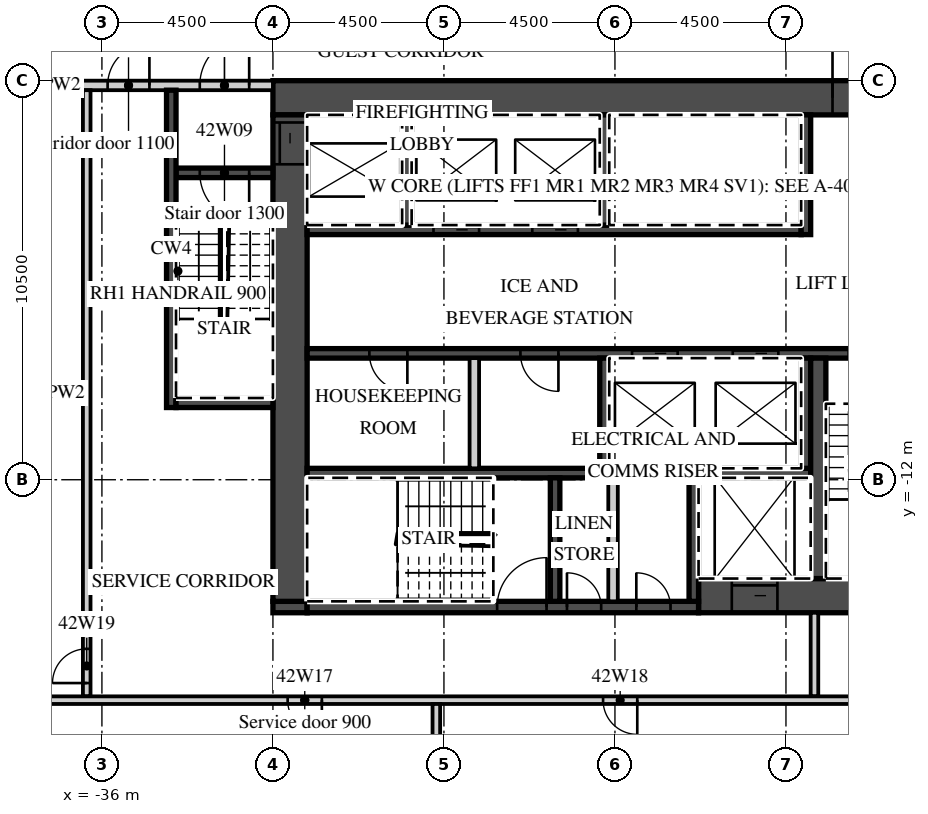
"""IFC4 building model, lengths in metres.
Left out: names, types, materials, properties, quantities, classifications, styles, units other than length and angle.
Written with IfcOpenShell. Run it as: python <this file> out.ifc"""

import sys

from ifc_helpers import new_model, si_unit, direction, frame, frame_2d, origin, place, context, subcontext, project, spatial, rectangle, extrude, element, fill, save


model = new_model("IFC4")
c1 = context("Model", 3, precision=1e-05, world=origin(), true_north=direction((0.0, 1.0)))
c2 = subcontext(c1, "Body", "Model", "MODEL_VIEW")
j1 = project(units=[si_unit("LENGTHUNIT", "METRE"), si_unit("PLANEANGLEUNIT", "RADIAN")], contexts=[c1])
p1 = place(None, origin())
s1 = spatial("IfcSite", under=j1, at=p1, CompositionType="ELEMENT")
p2 = place(p1, origin())
s2 = spatial("IfcBuilding", under=s1, at=p2, CompositionType="ELEMENT")
p3 = place(p2, frame((0.0, 0.0, 180.1)))
s3 = spatial("IfcBuildingStorey", under=s2, at=p3, CompositionType="ELEMENT", Elevation=180.1)
p4 = place(p3, frame((-31.5, -1.95, 0.0), z_axis=(0.0, 0.0, 1.0), x_axis=(1.0, 0.0, 0.0)))
e1 = element("IfcWall", 1, at=p4, inside=s3, PredefinedType="SHEAR", context=c2, shape_type="SweptSolid", body=[
    extrude(rectangle(XDim=18.0, YDim=0.9, at=frame_2d((9.0, 0.0))), origin(), (0.0, 0.0, 1.0), 3.02),
])
p5 = place(p4, frame((14.725, 0.0, 0.0)))
e2 = element("IfcOpeningElement", 2, at=p5, cuts=e1, PredefinedType="OPENING", context=c2, shape_type="SweptSolid", body=[
    extrude(rectangle(XDim=1.8, YDim=2.1, at=frame_2d((0.9, 1.05))), frame((0.0, 0.46, 0.0), z_axis=(0.0, -1.0, 0.0), x_axis=(1.0, 0.0, 0.0)), (0.0, 0.0, 1.0), 0.92),
])
p6 = place(p3, frame((-20.3, -15.05, 0.0), z_axis=(0.0, 0.0, 1.0), x_axis=(1.0, 0.0, 0.0)))
e3 = element("IfcWall", 3, at=p6, inside=s3, PredefinedType="SHEAR", context=c2, shape_type="SweptSolid", body=[
    extrude(rectangle(XDim=6.8, YDim=0.9, at=frame_2d((3.4, 0.0))), origin(), (0.0, 0.0, 1.0), 3.02),
])
p7 = place(p6, frame((0.875, 0.0, 0.0)))
e4 = element("IfcOpeningElement", 4, at=p7, cuts=e3, PredefinedType="OPENING", context=c2, shape_type="SweptSolid", body=[
    extrude(rectangle(XDim=1.2, YDim=2.1, at=frame_2d((0.6, 1.05))), frame((0.0, 0.46, 0.0), z_axis=(0.0, -1.0, 0.0), x_axis=(1.0, 0.0, 0.0)), (0.0, 0.0, 1.0), 0.92),
])
p8 = place(p3, frame((-31.5, -15.35, 0.0), z_axis=(0.0, 0.0, 1.0), x_axis=(1.0, 0.0, 0.0)))
e5 = element("IfcWall", 5, at=p8, inside=s3, PredefinedType="SHEAR", context=c2, shape_type="SweptSolid", body=[
    extrude(rectangle(XDim=0.9, YDim=0.3, at=frame_2d((0.45, 0.0))), origin(), (0.0, 0.0, 1.0), 3.02),
])
p9 = place(p3, frame((-30.6, -15.35, 0.0), z_axis=(0.0, 0.0, 1.0), x_axis=(1.0, 0.0, 0.0)))
e6 = element("IfcWall", 6, at=p9, inside=s3, PredefinedType="SHEAR", context=c2, shape_type="SweptSolid", body=[
    extrude(rectangle(XDim=10.3, YDim=0.3, at=frame_2d((5.15, 0.0))), origin(), (0.0, 0.0, 1.0), 3.02),
])
p10 = place(p9, frame((5.0, 0.0, 0.0)))
e7 = element("IfcOpeningElement", 7, at=p10, cuts=e6, PredefinedType="OPENING", context=c2, shape_type="SweptSolid", body=[
    extrude(rectangle(XDim=1.3, YDim=2.1, at=frame_2d((0.65, 1.05))), frame((0.0, 0.16, 0.0), z_axis=(0.0, -1.0, 0.0), x_axis=(1.0, 0.0, 0.0)), (0.0, 0.0, 1.0), 0.32),
])
p11 = place(p9, frame((6.837, 0.0, 0.0)))
e8 = element("IfcOpeningElement", 8, at=p11, cuts=e6, PredefinedType="OPENING", context=c2, shape_type="SweptSolid", body=[
    extrude(rectangle(XDim=0.9, YDim=2.1, at=frame_2d((0.45, 1.05))), frame((0.0, 0.16, 0.0), z_axis=(0.0, -1.0, 0.0), x_axis=(1.0, 0.0, 0.0)), (0.0, 0.0, 1.0), 0.32),
])
p12 = place(p9, frame((8.663, 0.0, 0.0)))
e9 = element("IfcOpeningElement", 9, at=p12, cuts=e6, PredefinedType="OPENING", context=c2, shape_type="SweptSolid", body=[
    extrude(rectangle(XDim=0.9, YDim=2.1, at=frame_2d((0.45, 1.05))), frame((0.0, 0.16, 0.0), z_axis=(0.0, -1.0, 0.0), x_axis=(1.0, 0.0, 0.0)), (0.0, 0.0, 1.0), 0.32),
])
p13 = place(p3, frame((-31.05, -15.2, 0.0), z_axis=(0.0, 0.0, 1.0), x_axis=(0.0, 1.0, 0.0)))
e10 = element("IfcWall", 10, at=p13, inside=s3, PredefinedType="SHEAR", context=c2, shape_type="SweptSolid", body=[
    extrude(rectangle(XDim=12.8, YDim=0.9, at=frame_2d((6.4, 0.0))), origin(), (0.0, 0.0, 1.0), 3.02),
])
p14 = place(p13, frame((11.5, 0.0, 0.0)))
e11 = element("IfcOpeningElement", 11, at=p14, cuts=e10, PredefinedType="OPENING", context=c2, shape_type="SweptSolid", body=[
    extrude(rectangle(XDim=1.1, YDim=2.1, at=frame_2d((0.55, 1.05))), frame((0.0, 0.46, 0.0), z_axis=(0.0, -1.0, 0.0), x_axis=(1.0, 0.0, 0.0)), (0.0, 0.0, 1.0), 0.92),
])
p15 = place(p3, frame((-30.6, -5.425, 0.0), z_axis=(0.0, 0.0, 1.0), x_axis=(1.0, 0.0, 0.0)))
e12 = element("IfcWall", 12, at=p15, inside=s3, PredefinedType="SHEAR", context=c2, shape_type="SweptSolid", body=[
    extrude(rectangle(XDim=13.0, YDim=0.25, at=frame_2d((6.5, 0.0))), origin(), (0.0, 0.0, 1.0), 3.02),
])
p16 = place(p15, frame((3.325, 0.0, 0.0)))
e13 = element("IfcOpeningElement", 13, at=p16, cuts=e12, PredefinedType="OPENING", context=c2, shape_type="SweptSolid", body=[
    extrude(rectangle(XDim=1.2, YDim=2.1, at=frame_2d((0.6, 1.05))), frame((0.0, 0.135, 0.0), z_axis=(0.0, -1.0, 0.0), x_axis=(1.0, 0.0, 0.0)), (0.0, 0.0, 1.0), 0.27),
])
p17 = place(p15, frame((5.925, 0.0, 0.0)))
e14 = element("IfcOpeningElement", 14, at=p17, cuts=e12, PredefinedType="OPENING", context=c2, shape_type="SweptSolid", body=[
    extrude(rectangle(XDim=1.2, YDim=2.1, at=frame_2d((0.6, 1.05))), frame((0.0, 0.135, 0.0), z_axis=(0.0, -1.0, 0.0), x_axis=(1.0, 0.0, 0.0)), (0.0, 0.0, 1.0), 0.27),
])
p18 = place(p3, frame((-17.475, -5.55, 0.0), z_axis=(0.0, 0.0, 1.0), x_axis=(0.0, 1.0, 0.0)))
e15 = element("IfcWall", 15, at=p18, inside=s3, PredefinedType="SHEAR", context=c2, shape_type="SweptSolid", body=[
    extrude(rectangle(XDim=3.15, YDim=0.25, at=frame_2d((1.575, 0.0))), origin(), (0.0, 0.0, 1.0), 3.02),
])
for number, where, z_axis, x_axis in (
    (16, (-27.975, -5.3, 0.0), (0.0, 0.0, 1.0), (0.0, 1.0, 0.0)),
    (17, (-22.775, -5.3, 0.0), (0.0, 0.0, 1.0), (0.0, 1.0, 0.0)),
):
    element("IfcWall", number, at=place(p3, frame(where, z_axis=z_axis, x_axis=x_axis)), inside=s3, PredefinedType="SHEAR", context=c2, shape_type="SweptSolid", body=[
        extrude(rectangle(XDim=2.9, YDim=0.25, at=frame_2d((1.45, 0.0))), origin(), (0.0, 0.0, 1.0), 3.02),
    ])
p19 = place(p3, frame((-30.6, -8.675, 0.0), z_axis=(0.0, 0.0, 1.0), x_axis=(1.0, 0.0, 0.0)))
e18 = element("IfcWall", 18, at=p19, inside=s3, PredefinedType="SHEAR", context=c2, shape_type="SweptSolid", body=[
    extrude(rectangle(XDim=16.2, YDim=0.25, at=frame_2d((8.1, 0.0))), origin(), (0.0, 0.0, 1.0), 3.02),
])
p20 = place(p19, frame((8.55, 0.0, 0.0)))
e19 = element("IfcOpeningElement", 19, at=p20, cuts=e18, PredefinedType="OPENING", context=c2, shape_type="SweptSolid", body=[
    extrude(rectangle(XDim=1.2, YDim=2.1, at=frame_2d((0.6, 1.05))), frame((0.0, 0.135, 0.0), z_axis=(0.0, -1.0, 0.0), x_axis=(1.0, 0.0, 0.0)), (0.0, 0.0, 1.0), 0.27),
])
p21 = place(p19, frame((11.2, 0.0, 0.0)))
e20 = element("IfcOpeningElement", 20, at=p21, cuts=e18, PredefinedType="OPENING", context=c2, shape_type="SweptSolid", body=[
    extrude(rectangle(XDim=1.2, YDim=2.1, at=frame_2d((0.6, 1.05))), frame((0.0, 0.135, 0.0), z_axis=(0.0, -1.0, 0.0), x_axis=(1.0, 0.0, 0.0)), (0.0, 0.0, 1.0), 0.27),
])
p22 = place(p19, frame((14.25, 0.0, 0.0)))
e21 = element("IfcOpeningElement", 21, at=p22, cuts=e18, PredefinedType="OPENING", context=c2, shape_type="SweptSolid", body=[
    extrude(rectangle(XDim=1.3, YDim=2.1, at=frame_2d((0.65, 1.05))), frame((0.0, 0.135, 0.0), z_axis=(0.0, -1.0, 0.0), x_axis=(1.0, 0.0, 0.0)), (0.0, 0.0, 1.0), 0.27),
])
p23 = place(p19, frame((1.637, 0.0, 0.0)))
e22 = element("IfcOpeningElement", 22, at=p23, cuts=e18, PredefinedType="OPENING", context=c2, shape_type="SweptSolid", body=[
    extrude(rectangle(XDim=1.0, YDim=2.1, at=frame_2d((0.5, 1.05))), frame((0.0, 0.135, 0.0), z_axis=(0.0, -1.0, 0.0), x_axis=(1.0, 0.0, 0.0)), (0.0, 0.0, 1.0), 0.27),
])
p24 = place(p19, frame((5.613, 0.0, 0.0)))
e23 = element("IfcOpeningElement", 23, at=p24, cuts=e18, PredefinedType="OPENING", context=c2, shape_type="SweptSolid", body=[
    extrude(rectangle(XDim=1.0, YDim=2.1, at=frame_2d((0.5, 1.05))), frame((0.0, 0.135, 0.0), z_axis=(0.0, -1.0, 0.0), x_axis=(1.0, 0.0, 0.0)), (0.0, 0.0, 1.0), 0.27),
])
p25 = place(p3, frame((-30.6, -11.825, 0.0), z_axis=(0.0, 0.0, 1.0), x_axis=(1.0, 0.0, 0.0)))
e24 = element("IfcWall", 24, at=p25, inside=s3, PredefinedType="SHEAR", context=c2, shape_type="SweptSolid", body=[
    extrude(rectangle(XDim=13.25, YDim=0.25, at=frame_2d((6.625, 0.0))), origin(), (0.0, 0.0, 1.0), 3.02),
])
for number, where, z_axis, x_axis in (
    (25, (-17.475, -11.7, 0.0), (0.0, 0.0, 1.0), (0.0, 1.0, 0.0)),
    (26, (-22.775, -11.7, 0.0), (0.0, 0.0, 1.0), (0.0, 1.0, 0.0)),
):
    element("IfcWall", number, at=place(p3, frame(where, z_axis=z_axis, x_axis=x_axis)), inside=s3, PredefinedType="SHEAR", context=c2, shape_type="SweptSolid", body=[
        extrude(rectangle(XDim=2.9, YDim=0.25, at=frame_2d((1.45, 0.0))), origin(), (0.0, 0.0, 1.0), 3.02),
    ])
p26 = place(p3, frame((-26.2, -11.7, 0.0), z_axis=(0.0, 0.0, 1.0), x_axis=(0.0, 1.0, 0.0)))
e27 = element("IfcWall", 27, at=p26, inside=s3, PredefinedType="PARTITIONING", context=c2, shape_type="SweptSolid", body=[
    extrude(rectangle(XDim=2.9, YDim=0.25, at=frame_2d((1.45, 0.0))), origin(), (0.0, 0.0, 1.0), 3.02),
])
p27 = place(p3, frame((-17.15, -14.6, 0.0), z_axis=(0.0, 0.0, 1.0), x_axis=(0.0, 1.0, 0.0)))
e28 = element("IfcWall", 28, at=p27, inside=s3, PredefinedType="SHEAR", context=c2, shape_type="SweptSolid", body=[
    extrude(rectangle(XDim=5.8, YDim=0.4, at=frame_2d((2.9, 0.0))), origin(), (0.0, 0.0, 1.0), 3.02),
])
for number, where, z_axis, x_axis in (
    (29, (-20.425, -15.2, 0.0), (0.0, 0.0, 1.0), (0.0, 1.0, 0.0)),
    (30, (-24.075, -15.2, 0.0), (0.0, 0.0, 1.0), (0.0, 1.0, 0.0)),
):
    element("IfcWall", number, at=place(p3, frame(where, z_axis=z_axis, x_axis=x_axis)), inside=s3, PredefinedType="SHEAR", context=c2, shape_type="SweptSolid", body=[
        extrude(rectangle(XDim=3.25, YDim=0.25, at=frame_2d((1.625, 0.0))), origin(), (0.0, 0.0, 1.0), 3.02),
    ])
p28 = place(p3, frame((-22.55, -15.2, 0.0), z_axis=(0.0, 0.0, 1.0), x_axis=(0.0, 1.0, 0.0)))
e31 = element("IfcWall", 31, at=p28, inside=s3, PredefinedType="PARTITIONING", context=c2, shape_type="SweptSolid", body=[
    extrude(rectangle(XDim=3.25, YDim=0.25, at=frame_2d((1.625, 0.0))), origin(), (0.0, 0.0, 1.0), 3.02),
])
p29 = place(p3, frame((-42.632, -1.625, 0.0), z_axis=(0.0, 0.0, 1.0), x_axis=(1.0, 0.0, 0.0)))
e32 = element("IfcWall", 32, at=p29, inside=s3, PredefinedType="PARTITIONING", context=c2, shape_type="SweptSolid", body=[
    extrude(rectangle(XDim=11.132, YDim=0.25, at=frame_2d((5.566, 0.0))), origin(), (0.0, 0.0, 1.0), 3.02),
])
p30 = place(p29, frame((9.207, 0.0, 0.0)))
e33 = element("IfcOpeningElement", 33, at=p30, cuts=e32, PredefinedType="OPENING", context=c2, shape_type="SweptSolid", body=[
    extrude(rectangle(XDim=1.3, YDim=2.1, at=frame_2d((0.65, 1.05))), frame((0.0, 0.135, 0.0), z_axis=(0.0, -1.0, 0.0), x_axis=(1.0, 0.0, 0.0)), (0.0, 0.0, 1.0), 0.27),
])
p31 = place(p29, frame((6.781, 0.0, 0.0)))
e34 = element("IfcOpeningElement", 34, at=p31, cuts=e32, PredefinedType="OPENING", context=c2, shape_type="SweptSolid", body=[
    extrude(rectangle(XDim=1.1, YDim=2.1, at=frame_2d((0.55, 1.05))), frame((0.0, 0.135, 0.0), z_axis=(0.0, -1.0, 0.0), x_axis=(1.0, 0.0, 0.0)), (0.0, 0.0, 1.0), 0.27),
])
p32 = place(p3, frame((-34.05, -3.925, 0.0), z_axis=(0.0, 0.0, 1.0), x_axis=(1.0, 0.0, 0.0)))
e35 = element("IfcWall", 35, at=p32, inside=s3, PredefinedType="SHEAR", context=c2, shape_type="SweptSolid", body=[
    extrude(rectangle(XDim=2.55, YDim=0.25, at=frame_2d((1.275, 0.0))), origin(), (0.0, 0.0, 1.0), 3.02),
])
p33 = place(p32, frame((0.625, 0.0, 0.0)))
e36 = element("IfcOpeningElement", 36, at=p33, cuts=e35, PredefinedType="OPENING", context=c2, shape_type="SweptSolid", body=[
    extrude(rectangle(XDim=1.3, YDim=2.1, at=frame_2d((0.65, 1.05))), frame((0.0, 0.135, 0.0), z_axis=(0.0, -1.0, 0.0), x_axis=(1.0, 0.0, 0.0)), (0.0, 0.0, 1.0), 0.27),
])
p34 = place(p3, frame((-34.175, -10.1, 0.0), z_axis=(0.0, 0.0, 1.0), x_axis=(0.0, 1.0, 0.0)))
e37 = element("IfcWall", 37, at=p34, inside=s3, PredefinedType="SHEAR", context=c2, shape_type="SweptSolid", body=[
    extrude(rectangle(XDim=8.35, YDim=0.25, at=frame_2d((4.175, 0.0))), origin(), (0.0, 0.0, 1.0), 3.02),
])
p35 = place(p3, frame((-34.05, -9.975, 0.0), z_axis=(0.0, 0.0, 1.0), x_axis=(1.0, 0.0, 0.0)))
e38 = element("IfcWall", 38, at=p35, inside=s3, PredefinedType="SHEAR", context=c2, shape_type="SweptSolid", body=[
    extrude(rectangle(XDim=2.55, YDim=0.25, at=frame_2d((1.275, 0.0))), origin(), (0.0, 0.0, 1.0), 3.02),
])
p36 = place(p3, frame((-17.25, -17.7, 0.0), z_axis=(0.0, 0.0, 1.0), x_axis=(0.0, 1.0, 0.0)))
e39 = element("IfcWall", 39, at=p36, inside=s3, PredefinedType="PARTITIONING", context=c2, shape_type="SweptSolid", body=[
    extrude(rectangle(XDim=2.2, YDim=0.2, at=frame_2d((1.1, 0.0))), origin(), (0.0, 0.0, 1.0), 3.02),
])
p37 = place(p3, frame((-36.4, -17.7, 0.0), z_axis=(0.0, 0.0, 1.0), x_axis=(0.0, 1.0, 0.0)))
e40 = element("IfcWall", 40, at=p37, inside=s3, PredefinedType="PARTITIONING", context=c2, shape_type="SweptSolid", body=[
    extrude(rectangle(XDim=15.95, YDim=0.2, at=frame_2d((7.975, 0.0))), origin(), (0.0, 0.0, 1.0), 3.02),
])
p38 = place(p37, frame((0.35, 0.0, 0.0)))
e41 = element("IfcOpeningElement", 41, at=p38, cuts=e40, PredefinedType="OPENING", context=c2, shape_type="SweptSolid", body=[
    extrude(rectangle(XDim=0.9, YDim=2.1, at=frame_2d((0.45, 1.05))), frame((0.0, 0.11, 0.0), z_axis=(0.0, -1.0, 0.0), x_axis=(1.0, 0.0, 0.0)), (0.0, 0.0, 1.0), 0.22),
])
p39 = place(p3, frame((-41.074, -17.8, 0.0), z_axis=(0.0, 0.0, 1.0), x_axis=(1.0, 0.0, 0.0)))
e42 = element("IfcWall", 42, at=p39, inside=s3, PredefinedType="PARTITIONING", context=c2, shape_type="SweptSolid", body=[
    extrude(rectangle(XDim=27.474, YDim=0.2, at=frame_2d((13.737, 0.0))), origin(), (0.0, 0.0, 1.0), 3.02),
])
p40 = place(p39, frame((9.962, 0.0, 0.0)))
e43 = element("IfcOpeningElement", 43, at=p40, cuts=e42, PredefinedType="OPENING", context=c2, shape_type="SweptSolid", body=[
    extrude(rectangle(XDim=0.9, YDim=2.1, at=frame_2d((0.45, 1.05))), frame((0.0, 0.11, 0.0), z_axis=(0.0, -1.0, 0.0), x_axis=(1.0, 0.0, 0.0)), (0.0, 0.0, 1.0), 0.22),
])
p41 = place(p39, frame((18.262, 0.0, 0.0)))
e44 = element("IfcOpeningElement", 44, at=p41, cuts=e42, PredefinedType="OPENING", context=c2, shape_type="SweptSolid", body=[
    extrude(rectangle(XDim=0.9, YDim=2.1, at=frame_2d((0.45, 1.05))), frame((0.0, 0.11, 0.0), z_axis=(0.0, -1.0, 0.0), x_axis=(1.0, 0.0, 0.0)), (0.0, 0.0, 1.0), 0.22),
])
p42 = place(p3, frame((-27.2, -23.621, 0.0), z_axis=(0.0, 0.0, 1.0), x_axis=(0.0, 1.0, 0.0)))
e45 = element("IfcWall", 45, at=p42, inside=s3, PredefinedType="PARTITIONING", context=c2, shape_type="SweptSolid", body=[
    extrude(rectangle(XDim=5.721, YDim=0.2, at=frame_2d((2.86, 0.0))), origin(), (0.0, 0.0, 1.0), 3.02),
])
p43 = place(p20, origin())
e46 = element("IfcDoor", 46, at=p43, inside=s3, OperationType="SLIDING_TO_LEFT", PredefinedType="DOOR", context=c2, shape_type="SweptSolid", body=[
    extrude(rectangle(XDim=1.2, YDim=2.1, at=frame_2d((0.6, 1.05))), frame((0.0, 0.025, 0.0), z_axis=(0.0, -1.0, 0.0), x_axis=(1.0, 0.0, 0.0)), (0.0, 0.0, 1.0), 0.05),
])
fill(e19, e46)
p44 = place(p21, origin())
e47 = element("IfcDoor", 47, at=p44, inside=s3, OperationType="SLIDING_TO_RIGHT", PredefinedType="DOOR", context=c2, shape_type="SweptSolid", body=[
    extrude(rectangle(XDim=1.2, YDim=2.1, at=frame_2d((0.6, 1.05))), frame((0.0, 0.025, 0.0), z_axis=(0.0, -1.0, 0.0), x_axis=(1.0, 0.0, 0.0)), (0.0, 0.0, 1.0), 0.05),
])
fill(e20, e47)
p45 = place(p16, origin())
e48 = element("IfcDoor", 48, at=p45, inside=s3, OperationType="SLIDING_TO_RIGHT", PredefinedType="DOOR", context=c2, shape_type="SweptSolid", body=[
    extrude(rectangle(XDim=1.2, YDim=2.1, at=frame_2d((0.6, 1.05))), frame((0.0, 0.025, 0.0), z_axis=(0.0, -1.0, 0.0), x_axis=(1.0, 0.0, 0.0)), (0.0, 0.0, 1.0), 0.05),
])
fill(e13, e48)
p46 = place(p17, origin())
e49 = element("IfcDoor", 49, at=p46, inside=s3, OperationType="SLIDING_TO_RIGHT", PredefinedType="DOOR", context=c2, shape_type="SweptSolid", body=[
    extrude(rectangle(XDim=1.2, YDim=2.1, at=frame_2d((0.6, 1.05))), frame((0.0, 0.025, 0.0), z_axis=(0.0, -1.0, 0.0), x_axis=(1.0, 0.0, 0.0)), (0.0, 0.0, 1.0), 0.05),
])
fill(e14, e49)
p47 = place(p7, origin())
e50 = element("IfcDoor", 50, at=p47, inside=s3, OperationType="SLIDING_TO_LEFT", PredefinedType="DOOR", context=c2, shape_type="SweptSolid", body=[
    extrude(rectangle(XDim=1.2, YDim=2.1, at=frame_2d((0.6, 1.05))), frame((0.0, 0.025, 0.0), z_axis=(0.0, -1.0, 0.0), x_axis=(1.0, 0.0, 0.0)), (0.0, 0.0, 1.0), 0.05),
])
fill(e4, e50)
p48 = place(p14, origin())
e51 = element("IfcDoor", 51, at=p48, inside=s3, OperationType="SLIDING_TO_RIGHT", PredefinedType="DOOR", context=c2, shape_type="SweptSolid", body=[
    extrude(rectangle(XDim=1.1, YDim=2.1, at=frame_2d((0.55, 1.05))), frame((0.0, 0.025, 0.0), z_axis=(0.0, -1.0, 0.0), x_axis=(1.0, 0.0, 0.0)), (0.0, 0.0, 1.0), 0.05),
])
fill(e11, e51)
p49 = place(p5, origin())
e52 = element("IfcDoor", 52, at=p49, inside=s3, OperationType="DOUBLE_DOOR_DOUBLE_SWING", PredefinedType="DOOR", context=c2, shape_type="SweptSolid", body=[
    extrude(rectangle(XDim=1.8, YDim=2.1, at=frame_2d((0.9, 1.05))), frame((0.0, 0.025, 0.0), z_axis=(0.0, -1.0, 0.0), x_axis=(1.0, 0.0, 0.0)), (0.0, 0.0, 1.0), 0.05),
])
fill(e2, e52)
p50 = place(p30, origin())
e53 = element("IfcDoor", 53, at=p50, inside=s3, OperationType="SINGLE_SWING_RIGHT", PredefinedType="DOOR", context=c2, shape_type="SweptSolid", body=[
    extrude(rectangle(XDim=1.3, YDim=2.1, at=frame_2d((0.65, 1.05))), frame((0.0, 0.025, 0.0), z_axis=(0.0, -1.0, 0.0), x_axis=(1.0, 0.0, 0.0)), (0.0, 0.0, 1.0), 0.05),
])
fill(e33, e53)
p51 = place(p33, origin())
e54 = element("IfcDoor", 54, at=p51, inside=s3, OperationType="SINGLE_SWING_RIGHT", PredefinedType="DOOR", context=c2, shape_type="SweptSolid", body=[
    extrude(rectangle(XDim=1.3, YDim=2.1, at=frame_2d((0.65, 1.05))), frame((0.0, 0.025, 0.0), z_axis=(0.0, -1.0, 0.0), x_axis=(1.0, 0.0, 0.0)), (0.0, 0.0, 1.0), 0.05),
])
fill(e36, e54)
p52 = place(p31, origin())
e55 = element("IfcDoor", 55, at=p52, inside=s3, OperationType="SINGLE_SWING_RIGHT", PredefinedType="DOOR", context=c2, shape_type="SweptSolid", body=[
    extrude(rectangle(XDim=1.1, YDim=2.1, at=frame_2d((0.55, 1.05))), frame((0.0, 0.025, 0.0), z_axis=(0.0, -1.0, 0.0), x_axis=(1.0, 0.0, 0.0)), (0.0, 0.0, 1.0), 0.05),
])
fill(e34, e55)
p53 = place(p22, origin())
e56 = element("IfcDoor", 56, at=p53, inside=s3, OperationType="SINGLE_SWING_RIGHT", PredefinedType="DOOR", context=c2, shape_type="SweptSolid", body=[
    extrude(rectangle(XDim=1.3, YDim=2.1, at=frame_2d((0.65, 1.05))), frame((0.0, 0.025, 0.0), z_axis=(0.0, -1.0, 0.0), x_axis=(1.0, 0.0, 0.0)), (0.0, 0.0, 1.0), 0.05),
])
fill(e21, e56)
p54 = place(p10, origin())
e57 = element("IfcDoor", 57, at=p54, inside=s3, OperationType="SINGLE_SWING_RIGHT", PredefinedType="DOOR", context=c2, shape_type="SweptSolid", body=[
    extrude(rectangle(XDim=1.3, YDim=2.1, at=frame_2d((0.65, 1.05))), frame((0.0, 0.025, 0.0), z_axis=(0.0, -1.0, 0.0), x_axis=(1.0, 0.0, 0.0)), (0.0, 0.0, 1.0), 0.05),
])
fill(e7, e57)
p55 = place(p11, origin())
e58 = element("IfcDoor", 58, at=p55, inside=s3, OperationType="SINGLE_SWING_LEFT", PredefinedType="DOOR", context=c2, shape_type="SweptSolid", body=[
    extrude(rectangle(XDim=0.9, YDim=2.1, at=frame_2d((0.45, 1.05))), frame((0.0, 0.025, 0.0), z_axis=(0.0, -1.0, 0.0), x_axis=(1.0, 0.0, 0.0)), (0.0, 0.0, 1.0), 0.05),
])
fill(e8, e58)
p56 = place(p12, origin())
e59 = element("IfcDoor", 59, at=p56, inside=s3, OperationType="SINGLE_SWING_LEFT", PredefinedType="DOOR", context=c2, shape_type="SweptSolid", body=[
    extrude(rectangle(XDim=0.9, YDim=2.1, at=frame_2d((0.45, 1.05))), frame((0.0, 0.025, 0.0), z_axis=(0.0, -1.0, 0.0), x_axis=(1.0, 0.0, 0.0)), (0.0, 0.0, 1.0), 0.05),
])
fill(e9, e59)
p57 = place(p23, origin())
e60 = element("IfcDoor", 60, at=p57, inside=s3, OperationType="SINGLE_SWING_RIGHT", PredefinedType="DOOR", context=c2, shape_type="SweptSolid", body=[
    extrude(rectangle(XDim=1.0, YDim=2.1, at=frame_2d((0.5, 1.05))), frame((0.0, 0.025, 0.0), z_axis=(0.0, -1.0, 0.0), x_axis=(1.0, 0.0, 0.0)), (0.0, 0.0, 1.0), 0.05),
])
fill(e22, e60)
p58 = place(p24, origin())
e61 = element("IfcDoor", 61, at=p58, inside=s3, OperationType="SINGLE_SWING_RIGHT", PredefinedType="DOOR", context=c2, shape_type="SweptSolid", body=[
    extrude(rectangle(XDim=1.0, YDim=2.1, at=frame_2d((0.5, 1.05))), frame((0.0, 0.025, 0.0), z_axis=(0.0, -1.0, 0.0), x_axis=(1.0, 0.0, 0.0)), (0.0, 0.0, 1.0), 0.05),
])
fill(e23, e61)
p59 = place(p40, origin())
e62 = element("IfcDoor", 62, at=p59, inside=s3, OperationType="SINGLE_SWING_RIGHT", PredefinedType="DOOR", context=c2, shape_type="SweptSolid", body=[
    extrude(rectangle(XDim=0.9, YDim=2.1, at=frame_2d((0.45, 1.05))), frame((0.0, 0.025, 0.0), z_axis=(0.0, -1.0, 0.0), x_axis=(1.0, 0.0, 0.0)), (0.0, 0.0, 1.0), 0.05),
])
fill(e43, e62)
p60 = place(p41, origin())
e63 = element("IfcDoor", 63, at=p60, inside=s3, OperationType="SINGLE_SWING_RIGHT", PredefinedType="DOOR", context=c2, shape_type="SweptSolid", body=[
    extrude(rectangle(XDim=0.9, YDim=2.1, at=frame_2d((0.45, 1.05))), frame((0.0, 0.025, 0.0), z_axis=(0.0, -1.0, 0.0), x_axis=(1.0, 0.0, 0.0)), (0.0, 0.0, 1.0), 0.05),
])
fill(e44, e63)
p61 = place(p38, origin())
e64 = element("IfcDoor", 64, at=p61, inside=s3, OperationType="SINGLE_SWING_LEFT", PredefinedType="DOOR", context=c2, shape_type="SweptSolid", body=[
    extrude(rectangle(XDim=0.9, YDim=2.1, at=frame_2d((0.45, 1.05))), frame((0.0, 0.025, 0.0), z_axis=(0.0, -1.0, 0.0), x_axis=(1.0, 0.0, 0.0)), (0.0, 0.0, 1.0), 0.05),
])
fill(e41, e64)
save(model, sys.argv[1])
